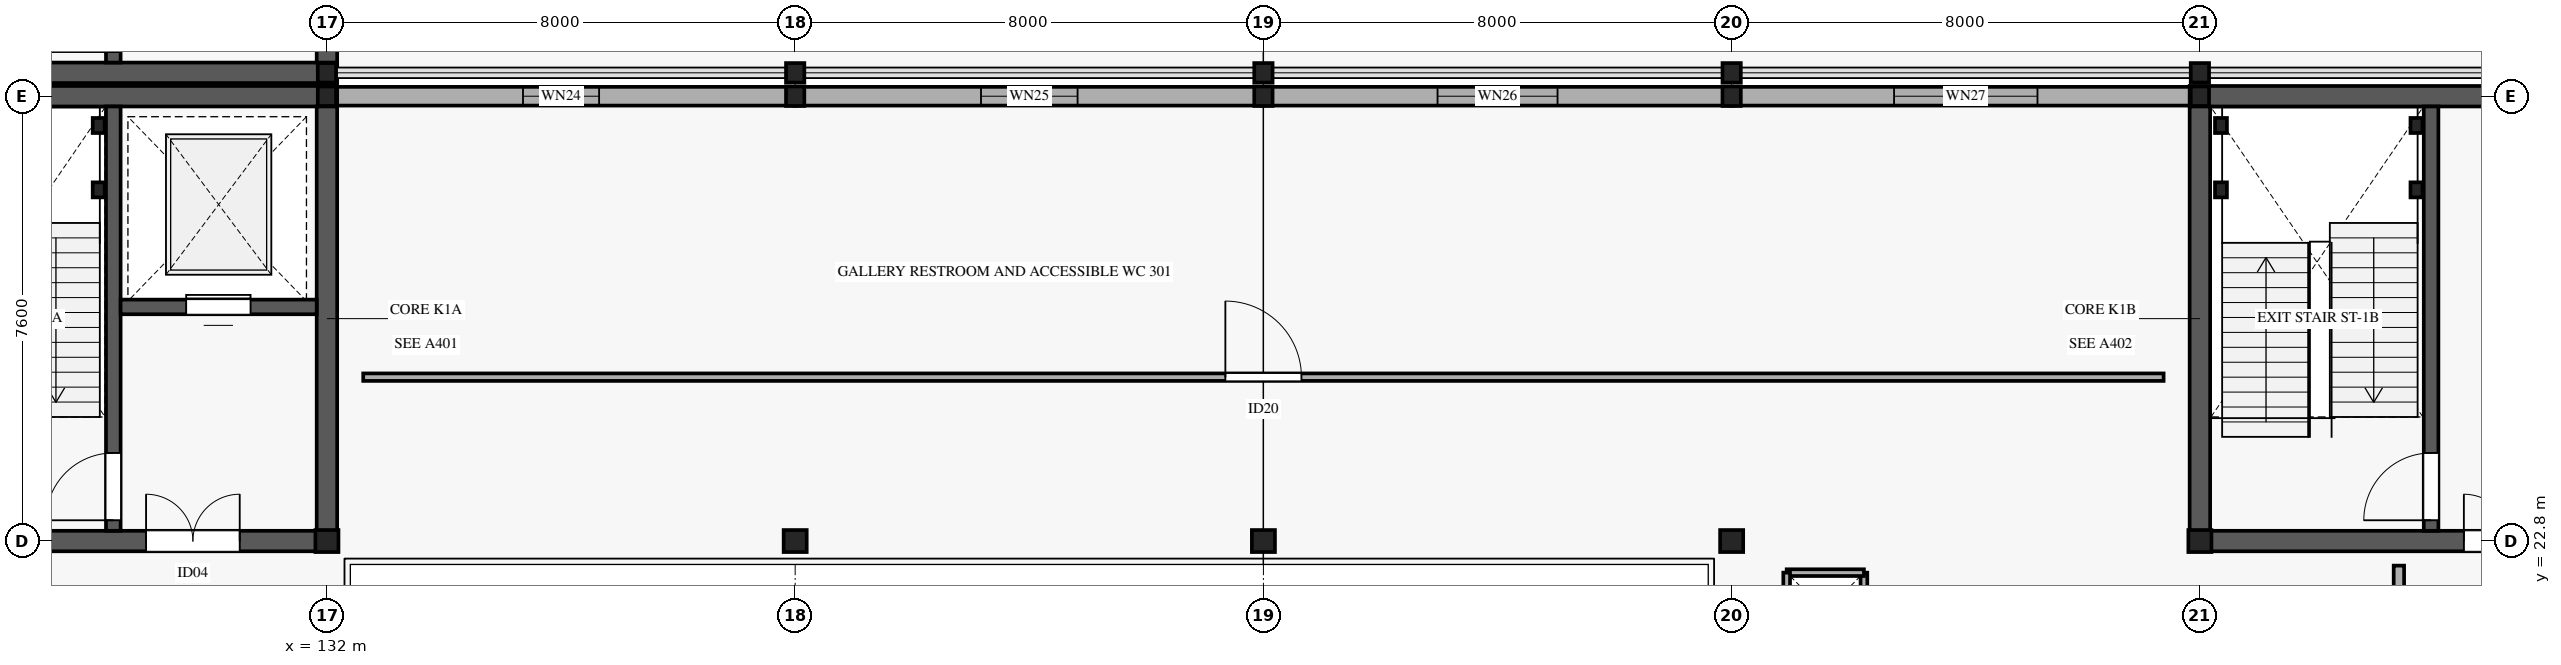
"""IFC4 building model, lengths in metres.
Left out: names, types, materials, properties, quantities, classifications, styles, units other than length and angle.
Written with IfcOpenShell. Run it as: python <this file> out.ifc"""

import sys

from ifc_helpers import new_model, si_unit, direction, frame, frame_2d, origin, origin_2d, place, context, subcontext, project, spatial, rectangle, i_section, extrude, element, fill, save


model = new_model("IFC4")
c1 = context("Model", 3, precision=1e-05, world=origin(), true_north=direction((0.0, 1.0)))
c2 = subcontext(c1, "Body", "Model", "MODEL_VIEW")
j1 = project(units=[si_unit("LENGTHUNIT", "METRE"), si_unit("PLANEANGLEUNIT", "RADIAN")], contexts=[c1])
p1 = place(None, origin())
s1 = spatial("IfcSite", under=j1, at=p1, CompositionType="ELEMENT")
p2 = place(p1, origin())
s2 = spatial("IfcBuilding", under=s1, at=p2, CompositionType="ELEMENT")
p3 = place(p2, frame((0.0, 0.0, 10.8)))
s3 = spatial("IfcBuildingStorey", under=s2, at=p3, CompositionType="ELEMENT", Elevation=10.8)
p4 = place(p3, frame((132.0, 22.8, 0.0), z_axis=(0.0, 0.0, 1.0), x_axis=(1.0, 0.0, 0.0)))
e1 = element("IfcColumn", 1, at=p4, inside=s3, PredefinedType="COLUMN", context=c2, shape_type="SweptSolid", body=[
    extrude(i_section(OverallWidth=0.394, OverallDepth=0.376, WebThickness=0.017, FlangeThickness=0.028, FilletRadius=0.015, at=origin_2d()), origin(), (0.0, 0.0, 1.0), 4.59),
])
p5 = place(p3, frame((132.0, 30.4, 0.0), z_axis=(0.0, 0.0, 1.0), x_axis=(1.0, 0.0, 0.0)))
e2 = element("IfcColumn", 2, at=p5, inside=s3, PredefinedType="COLUMN", context=c2, shape_type="SweptSolid", body=[
    extrude(i_section(OverallWidth=0.313, OverallDepth=0.333, WebThickness=0.018, FlangeThickness=0.028, FilletRadius=0.015, at=origin_2d()), origin(), (0.0, 0.0, 1.0), 4.59),
])
p6 = place(p3, frame((140.0, 22.8, 0.0), z_axis=(0.0, 0.0, 1.0), x_axis=(1.0, 0.0, 0.0)))
e3 = element("IfcColumn", 3, at=p6, inside=s3, PredefinedType="COLUMN", context=c2, shape_type="SweptSolid", body=[
    extrude(i_section(OverallWidth=0.394, OverallDepth=0.376, WebThickness=0.017, FlangeThickness=0.028, FilletRadius=0.015, at=origin_2d()), origin(), (0.0, 0.0, 1.0), 4.59),
])
p7 = place(p3, frame((140.0, 30.4, 0.0), z_axis=(0.0, 0.0, 1.0), x_axis=(1.0, 0.0, 0.0)))
e4 = element("IfcColumn", 4, at=p7, inside=s3, PredefinedType="COLUMN", context=c2, shape_type="SweptSolid", body=[
    extrude(i_section(OverallWidth=0.313, OverallDepth=0.333, WebThickness=0.018, FlangeThickness=0.028, FilletRadius=0.015, at=origin_2d()), origin(), (0.0, 0.0, 1.0), 4.59),
])
p8 = place(p3, frame((148.0, 22.8, 0.0), z_axis=(0.0, 0.0, 1.0), x_axis=(1.0, 0.0, 0.0)))
e5 = element("IfcColumn", 5, at=p8, inside=s3, PredefinedType="COLUMN", context=c2, shape_type="SweptSolid", body=[
    extrude(i_section(OverallWidth=0.394, OverallDepth=0.376, WebThickness=0.017, FlangeThickness=0.028, FilletRadius=0.015, at=origin_2d()), origin(), (0.0, 0.0, 1.0), 4.59),
])
p9 = place(p3, frame((148.0, 30.4, 0.0), z_axis=(0.0, 0.0, 1.0), x_axis=(1.0, 0.0, 0.0)))
e6 = element("IfcColumn", 6, at=p9, inside=s3, PredefinedType="COLUMN", context=c2, shape_type="SweptSolid", body=[
    extrude(i_section(OverallWidth=0.313, OverallDepth=0.333, WebThickness=0.018, FlangeThickness=0.028, FilletRadius=0.015, at=origin_2d()), origin(), (0.0, 0.0, 1.0), 4.59),
])
p10 = place(p3, frame((156.0, 22.8, 0.0), z_axis=(0.0, 0.0, 1.0), x_axis=(1.0, 0.0, 0.0)))
e7 = element("IfcColumn", 7, at=p10, inside=s3, PredefinedType="COLUMN", context=c2, shape_type="SweptSolid", body=[
    extrude(i_section(OverallWidth=0.394, OverallDepth=0.376, WebThickness=0.017, FlangeThickness=0.028, FilletRadius=0.015, at=origin_2d()), origin(), (0.0, 0.0, 1.0), 4.59),
])
p11 = place(p3, frame((156.0, 30.4, 0.0), z_axis=(0.0, 0.0, 1.0), x_axis=(1.0, 0.0, 0.0)))
e8 = element("IfcColumn", 8, at=p11, inside=s3, PredefinedType="COLUMN", context=c2, shape_type="SweptSolid", body=[
    extrude(i_section(OverallWidth=0.313, OverallDepth=0.333, WebThickness=0.018, FlangeThickness=0.028, FilletRadius=0.015, at=origin_2d()), origin(), (0.0, 0.0, 1.0), 4.59),
])
p12 = place(p3, frame((164.0, 22.8, 0.0), z_axis=(0.0, 0.0, 1.0), x_axis=(1.0, 0.0, 0.0)))
e9 = element("IfcColumn", 9, at=p12, inside=s3, PredefinedType="COLUMN", context=c2, shape_type="SweptSolid", body=[
    extrude(i_section(OverallWidth=0.394, OverallDepth=0.376, WebThickness=0.017, FlangeThickness=0.028, FilletRadius=0.015, at=origin_2d()), origin(), (0.0, 0.0, 1.0), 4.59),
])
for number, where, z_axis, x_axis in (
    (10, (164.0, 30.4, 0.0), (0.0, 0.0, 1.0), (1.0, 0.0, 0.0)),
    (11, (132.0, 30.8, 0.0), (0.0, 0.0, 1.0), (1.0, 0.0, 0.0)),
    (12, (140.0, 30.8, 0.0), (0.0, 0.0, 1.0), (1.0, 0.0, 0.0)),
    (13, (148.0, 30.8, 0.0), (0.0, 0.0, 1.0), (1.0, 0.0, 0.0)),
    (14, (156.0, 30.8, 0.0), (0.0, 0.0, 1.0), (1.0, 0.0, 0.0)),
    (15, (164.0, 30.8, 0.0), (0.0, 0.0, 1.0), (1.0, 0.0, 0.0)),
):
    element("IfcColumn", number, at=place(p3, frame(where, z_axis=z_axis, x_axis=x_axis)), inside=s3, PredefinedType="COLUMN", context=c2, shape_type="SweptSolid", body=[
        extrude(i_section(OverallWidth=0.313, OverallDepth=0.333, WebThickness=0.018, FlangeThickness=0.028, FilletRadius=0.015, at=origin_2d()), origin(), (0.0, 0.0, 1.0), 4.59),
    ])
p13 = place(p3, frame((131.98, 30.4, 0.0), z_axis=(0.0, 0.0, 1.0), x_axis=(1.0, 0.0, 0.0)))
e16 = element("IfcWall", 16, at=p13, inside=s3, PredefinedType="STANDARD", context=c2, shape_type="SweptSolid", body=[
    extrude(rectangle(XDim=8.04, YDim=0.32, at=frame_2d((4.02, 0.0))), origin(), (0.0, 0.0, 1.0), 3.66),
])
p14 = place(p13, frame((3.37, 0.0, 0.75)))
e17 = element("IfcOpeningElement", 17, at=p14, cuts=e16, PredefinedType="OPENING", context=c2, shape_type="SweptSolid", body=[
    extrude(rectangle(XDim=1.3, YDim=1.55, at=frame_2d((0.65, 0.775))), frame((0.0, 0.17, 0.0), z_axis=(0.0, -1.0, 0.0), x_axis=(1.0, 0.0, 0.0)), (0.0, 0.0, 1.0), 0.34),
])
p15 = place(p3, frame((139.98, 30.4, 0.0), z_axis=(0.0, 0.0, 1.0), x_axis=(1.0, 0.0, 0.0)))
e18 = element("IfcWall", 18, at=p15, inside=s3, PredefinedType="STANDARD", context=c2, shape_type="SweptSolid", body=[
    extrude(rectangle(XDim=8.04, YDim=0.32, at=frame_2d((4.02, 0.0))), origin(), (0.0, 0.0, 1.0), 3.66),
])
p16 = place(p15, frame((3.195, 0.0, 0.75)))
e19 = element("IfcOpeningElement", 19, at=p16, cuts=e18, PredefinedType="OPENING", context=c2, shape_type="SweptSolid", body=[
    extrude(rectangle(XDim=1.65, YDim=1.55, at=frame_2d((0.825, 0.775))), frame((0.0, 0.17, 0.0), z_axis=(0.0, -1.0, 0.0), x_axis=(1.0, 0.0, 0.0)), (0.0, 0.0, 1.0), 0.34),
])
p17 = place(p3, frame((147.98, 30.4, 0.0), z_axis=(0.0, 0.0, 1.0), x_axis=(1.0, 0.0, 0.0)))
e20 = element("IfcWall", 20, at=p17, inside=s3, PredefinedType="STANDARD", context=c2, shape_type="SweptSolid", body=[
    extrude(rectangle(XDim=8.04, YDim=0.32, at=frame_2d((4.02, 0.0))), origin(), (0.0, 0.0, 1.0), 3.66),
])
p18 = place(p17, frame((2.995, 0.0, 0.75)))
e21 = element("IfcOpeningElement", 21, at=p18, cuts=e20, PredefinedType="OPENING", context=c2, shape_type="SweptSolid", body=[
    extrude(rectangle(XDim=2.05, YDim=1.55, at=frame_2d((1.025, 0.775))), frame((0.0, 0.17, 0.0), z_axis=(0.0, -1.0, 0.0), x_axis=(1.0, 0.0, 0.0)), (0.0, 0.0, 1.0), 0.34),
])
p19 = place(p3, frame((155.98, 30.4, 0.0), z_axis=(0.0, 0.0, 1.0), x_axis=(1.0, 0.0, 0.0)))
e22 = element("IfcWall", 22, at=p19, inside=s3, PredefinedType="STANDARD", context=c2, shape_type="SweptSolid", body=[
    extrude(rectangle(XDim=8.04, YDim=0.32, at=frame_2d((4.02, 0.0))), origin(), (0.0, 0.0, 1.0), 3.66),
])
p20 = place(p19, frame((2.795, 0.0, 0.75)))
e23 = element("IfcOpeningElement", 23, at=p20, cuts=e22, PredefinedType="OPENING", context=c2, shape_type="SweptSolid", body=[
    extrude(rectangle(XDim=2.45, YDim=1.55, at=frame_2d((1.225, 0.775))), frame((0.0, 0.17, 0.0), z_axis=(0.0, -1.0, 0.0), x_axis=(1.0, 0.0, 0.0)), (0.0, 0.0, 1.0), 0.34),
])
for number, where, z_axis, x_axis in (
    (24, (158.26, 20.94, 0.0), (0.0, 0.0, 1.0), (0.0, 1.0, 0.0)),
    (25, (158.26, 22.26, 0.0), (0.0, 0.0, 1.0), (-1.0, 0.0, 0.0)),
    (26, (156.94, 22.26, 0.0), (0.0, 0.0, 1.0), (0.0, -1.0, 0.0)),
):
    element("IfcWall", number, at=place(p3, frame(where, z_axis=z_axis, x_axis=x_axis)), inside=s3, PredefinedType="PARTITIONING", context=c2, shape_type="SweptSolid", body=[
        extrude(rectangle(XDim=1.32, YDim=0.115, at=frame_2d((0.66, 0.0))), origin(), (0.0, 0.0, 1.0), 3.75),
    ])
p21 = place(p3, frame((124.225, 22.8, 0.0), z_axis=(0.0, 0.0, 1.0), x_axis=(1.0, 0.0, 0.0)))
e27 = element("IfcWall", 27, at=p21, inside=s3, PredefinedType="SHEAR", context=c2, shape_type="SweptSolid", body=[
    extrude(rectangle(XDim=7.95, YDim=0.35, at=frame_2d((3.975, 0.0))), origin(), (0.0, 0.0, 1.0), 4.59),
])
p22 = place(p21, frame((4.685, 0.0, 0.0)))
e28 = element("IfcOpeningElement", 28, at=p22, cuts=e27, PredefinedType="OPENING", context=c2, shape_type="SweptSolid", body=[
    extrude(rectangle(XDim=1.6, YDim=2.35, at=frame_2d((0.8, 1.175))), frame((0.0, 0.185, 0.0), z_axis=(0.0, -1.0, 0.0), x_axis=(1.0, 0.0, 0.0)), (0.0, 0.0, 1.0), 0.37),
])
p23 = place(p3, frame((124.225, 30.4, 0.0), z_axis=(0.0, 0.0, 1.0), x_axis=(1.0, 0.0, 0.0)))
e29 = element("IfcWall", 29, at=p23, inside=s3, PredefinedType="SHEAR", context=c2, shape_type="SweptSolid", body=[
    extrude(rectangle(XDim=7.95, YDim=0.35, at=frame_2d((3.975, 0.0))), origin(), (0.0, 0.0, 1.0), 4.59),
])
p24 = place(p3, frame((132.0, 22.975, 0.0), z_axis=(0.0, 0.0, 1.0), x_axis=(0.0, 1.0, 0.0)))
e30 = element("IfcWall", 30, at=p24, inside=s3, PredefinedType="SHEAR", context=c2, shape_type="SweptSolid", body=[
    extrude(rectangle(XDim=7.25, YDim=0.35, at=frame_2d((3.625, 0.0))), origin(), (0.0, 0.0, 1.0), 4.59),
])
p25 = place(p3, frame((128.35, 22.975, 0.0), z_axis=(0.0, 0.0, 1.0), x_axis=(0.0, 1.0, 0.0)))
e31 = element("IfcWall", 31, at=p25, inside=s3, PredefinedType="SHEAR", context=c2, shape_type="SweptSolid", body=[
    extrude(rectangle(XDim=7.25, YDim=0.25, at=frame_2d((3.625, 0.0))), origin(), (0.0, 0.0, 1.0), 4.59),
])
p26 = place(p25, frame((0.18, 0.0, 0.0)))
e32 = element("IfcOpeningElement", 32, at=p26, cuts=e31, PredefinedType="OPENING", context=c2, shape_type="SweptSolid", body=[
    extrude(rectangle(XDim=1.15, YDim=2.2, at=frame_2d((0.575, 1.1))), frame((0.0, 0.135, 0.0), z_axis=(0.0, -1.0, 0.0), x_axis=(1.0, 0.0, 0.0)), (0.0, 0.0, 1.0), 0.27),
])
p27 = place(p3, frame((128.475, 26.8, 0.0), z_axis=(0.0, 0.0, 1.0), x_axis=(1.0, 0.0, 0.0)))
e33 = element("IfcWall", 33, at=p27, inside=s3, PredefinedType="SHEAR", context=c2, shape_type="SweptSolid", body=[
    extrude(rectangle(XDim=3.35, YDim=0.25, at=frame_2d((1.675, 0.0))), origin(), (0.0, 0.0, 1.0), 4.59),
])
p28 = place(p27, frame((1.12, 0.0, 0.0)))
e34 = element("IfcOpeningElement", 34, at=p28, cuts=e33, PredefinedType="OPENING", context=c2, shape_type="SweptSolid", body=[
    extrude(rectangle(XDim=1.1, YDim=2.2, at=frame_2d((0.55, 1.1))), frame((0.0, 0.135, 0.0), z_axis=(0.0, -1.0, 0.0), x_axis=(1.0, 0.0, 0.0)), (0.0, 0.0, 1.0), 0.27),
])
for number, where, z_axis, x_axis in (
    (35, (128.1, 28.8, 0.0), (0.0, 0.0, 1.0), (1.0, 0.0, 0.0)),
    (36, (128.1, 29.9, 0.0), (0.0, 0.0, 1.0), (1.0, 0.0, 0.0)),
):
    element("IfcColumn", number, at=place(p3, frame(where, z_axis=z_axis, x_axis=x_axis)), inside=s3, PredefinedType="COLUMN", context=c2, shape_type="SweptSolid", body=[
        extrude(i_section(OverallWidth=0.204, OverallDepth=0.257, WebThickness=0.009, FlangeThickness=0.016, FilletRadius=0.013, at=origin_2d()), origin(), (0.0, 0.0, 1.0), 4.795),
    ])
p29 = place(p3, frame((163.825, 22.8, 0.0), z_axis=(0.0, 0.0, 1.0), x_axis=(1.0, 0.0, 0.0)))
e37 = element("IfcWall", 37, at=p29, inside=s3, PredefinedType="SHEAR", context=c2, shape_type="SweptSolid", body=[
    extrude(rectangle(XDim=8.35, YDim=0.35, at=frame_2d((4.175, 0.0))), origin(), (0.0, 0.0, 1.0), 4.59),
])
p30 = place(p29, frame((4.685, 0.0, 0.0)))
e38 = element("IfcOpeningElement", 38, at=p30, cuts=e37, PredefinedType="OPENING", context=c2, shape_type="SweptSolid", body=[
    extrude(rectangle(XDim=1.6, YDim=2.35, at=frame_2d((0.8, 1.175))), frame((0.0, 0.185, 0.0), z_axis=(0.0, -1.0, 0.0), x_axis=(1.0, 0.0, 0.0)), (0.0, 0.0, 1.0), 0.37),
])
p31 = place(p3, frame((163.825, 30.4, 0.0), z_axis=(0.0, 0.0, 1.0), x_axis=(1.0, 0.0, 0.0)))
e39 = element("IfcWall", 39, at=p31, inside=s3, PredefinedType="SHEAR", context=c2, shape_type="SweptSolid", body=[
    extrude(rectangle(XDim=8.35, YDim=0.35, at=frame_2d((4.175, 0.0))), origin(), (0.0, 0.0, 1.0), 4.59),
])
p32 = place(p3, frame((164.0, 22.975, 0.0), z_axis=(0.0, 0.0, 1.0), x_axis=(0.0, 1.0, 0.0)))
e40 = element("IfcWall", 40, at=p32, inside=s3, PredefinedType="SHEAR", context=c2, shape_type="SweptSolid", body=[
    extrude(rectangle(XDim=7.25, YDim=0.35, at=frame_2d((3.625, 0.0))), origin(), (0.0, 0.0, 1.0), 4.59),
])
p33 = place(p3, frame((167.95, 22.975, 0.0), z_axis=(0.0, 0.0, 1.0), x_axis=(0.0, 1.0, 0.0)))
e41 = element("IfcWall", 41, at=p33, inside=s3, PredefinedType="SHEAR", context=c2, shape_type="SweptSolid", body=[
    extrude(rectangle(XDim=7.25, YDim=0.25, at=frame_2d((3.625, 0.0))), origin(), (0.0, 0.0, 1.0), 4.59),
])
p34 = place(p33, frame((0.18, 0.0, 0.0)))
e42 = element("IfcOpeningElement", 42, at=p34, cuts=e41, PredefinedType="OPENING", context=c2, shape_type="SweptSolid", body=[
    extrude(rectangle(XDim=1.15, YDim=2.2, at=frame_2d((0.575, 1.1))), frame((0.0, 0.135, 0.0), z_axis=(0.0, -1.0, 0.0), x_axis=(1.0, 0.0, 0.0)), (0.0, 0.0, 1.0), 0.27),
])
for number, where, z_axis, x_axis in (
    (43, (164.36, 28.8, 0.0), (0.0, 0.0, 1.0), (1.0, 0.0, 0.0)),
    (44, (167.7, 28.8, 0.0), (0.0, 0.0, 1.0), (1.0, 0.0, 0.0)),
    (45, (164.36, 29.9, 0.0), (0.0, 0.0, 1.0), (1.0, 0.0, 0.0)),
    (46, (167.7, 29.9, 0.0), (0.0, 0.0, 1.0), (1.0, 0.0, 0.0)),
):
    element("IfcColumn", number, at=place(p3, frame(where, z_axis=z_axis, x_axis=x_axis)), inside=s3, PredefinedType="COLUMN", context=c2, shape_type="SweptSolid", body=[
        extrude(i_section(OverallWidth=0.204, OverallDepth=0.257, WebThickness=0.009, FlangeThickness=0.016, FilletRadius=0.013, at=origin_2d()), origin(), (0.0, 0.0, 1.0), 4.795),
    ])
p35 = place(p3, frame((124.225, 30.8, 0.0), z_axis=(0.0, 0.0, 1.0), x_axis=(1.0, 0.0, 0.0)))
e47 = element("IfcWall", 47, at=p35, inside=s3, PredefinedType="SHEAR", context=c2, shape_type="SweptSolid", body=[
    extrude(rectangle(XDim=7.95, YDim=0.35, at=frame_2d((3.975, 0.0))), origin(), (0.0, 0.0, 1.0), 4.59),
])
p36 = place(p3, frame((132.0, 30.975, 0.0), z_axis=(0.0, 0.0, 1.0), x_axis=(0.0, 1.0, 0.0)))
e48 = element("IfcWall", 48, at=p36, inside=s3, PredefinedType="SHEAR", context=c2, shape_type="SweptSolid", body=[
    extrude(rectangle(XDim=6.85, YDim=0.35, at=frame_2d((3.425, 0.0))), origin(), (0.0, 0.0, 1.0), 4.59),
])
p37 = place(p36, frame((1.15, 0.0, 0.0)))
e49 = element("IfcOpeningElement", 49, at=p37, cuts=e48, PredefinedType="OPENING", context=c2, shape_type="SweptSolid", body=[
    extrude(rectangle(XDim=1.6, YDim=2.35, at=frame_2d((0.8, 1.175))), frame((0.0, 0.185, 0.0), z_axis=(0.0, -1.0, 0.0), x_axis=(1.0, 0.0, 0.0)), (0.0, 0.0, 1.0), 0.37),
])
p38 = place(p3, frame((128.35, 30.975, 0.0), z_axis=(0.0, 0.0, 1.0), x_axis=(0.0, 1.0, 0.0)))
e50 = element("IfcWall", 50, at=p38, inside=s3, PredefinedType="SHEAR", context=c2, shape_type="SweptSolid", body=[
    extrude(rectangle(XDim=6.85, YDim=0.25, at=frame_2d((3.425, 0.0))), origin(), (0.0, 0.0, 1.0), 4.59),
])
p39 = place(p38, frame((0.18, 0.0, 0.0)))
e51 = element("IfcOpeningElement", 51, at=p39, cuts=e50, PredefinedType="OPENING", context=c2, shape_type="SweptSolid", body=[
    extrude(rectangle(XDim=1.15, YDim=2.2, at=frame_2d((0.575, 1.1))), frame((0.0, 0.135, 0.0), z_axis=(0.0, -1.0, 0.0), x_axis=(1.0, 0.0, 0.0)), (0.0, 0.0, 1.0), 0.27),
])
p40 = place(p3, frame((167.4, 4.22, 0.0), z_axis=(0.0, 0.0, 1.0), x_axis=(0.0, 1.0, 0.0)))
e52 = element("IfcWall", 52, at=p40, inside=s3, PredefinedType="PARTITIONING", context=c2, shape_type="SweptSolid", body=[
    extrude(rectangle(XDim=18.16, YDim=0.178, at=frame_2d((9.08, 0.0))), origin(), (0.0, 0.0, 1.0), 3.45),
])
p41 = place(p3, frame((132.62, 25.6, 0.0), z_axis=(0.0, 0.0, 1.0), x_axis=(1.0, 0.0, 0.0)))
e53 = element("IfcWall", 53, at=p41, inside=s3, PredefinedType="PARTITIONING", context=c2, shape_type="SweptSolid", body=[
    extrude(rectangle(XDim=30.76, YDim=0.128, at=frame_2d((15.38, 0.0))), origin(), (0.0, 0.0, 1.0), 3.45),
])
p42 = place(p41, frame((14.73, 0.0, 0.0)))
e54 = element("IfcOpeningElement", 54, at=p42, cuts=e53, PredefinedType="OPENING", context=c2, shape_type="SweptSolid", body=[
    extrude(rectangle(XDim=1.3, YDim=2.2, at=frame_2d((0.65, 1.1))), frame((0.0, 0.074, 0.0), z_axis=(0.0, -1.0, 0.0), x_axis=(1.0, 0.0, 0.0)), (0.0, 0.0, 1.0), 0.148),
])
p43 = place(p14, origin())
e55 = element("IfcWindow", 55, at=p43, inside=s3, PartitioningType="SINGLE_PANEL", PredefinedType="WINDOW", context=c2, shape_type="SweptSolid", body=[
    extrude(rectangle(XDim=1.3, YDim=1.55, at=frame_2d((0.65, 0.775))), frame((0.0, 0.03, 0.0), z_axis=(0.0, -1.0, 0.0), x_axis=(1.0, 0.0, 0.0)), (0.0, 0.0, 1.0), 0.06),
])
fill(e17, e55)
p44 = place(p16, origin())
e56 = element("IfcWindow", 56, at=p44, inside=s3, PartitioningType="SINGLE_PANEL", PredefinedType="WINDOW", context=c2, shape_type="SweptSolid", body=[
    extrude(rectangle(XDim=1.65, YDim=1.55, at=frame_2d((0.825, 0.775))), frame((0.0, 0.03, 0.0), z_axis=(0.0, -1.0, 0.0), x_axis=(1.0, 0.0, 0.0)), (0.0, 0.0, 1.0), 0.06),
])
fill(e19, e56)
p45 = place(p18, origin())
e57 = element("IfcWindow", 57, at=p45, inside=s3, PartitioningType="SINGLE_PANEL", PredefinedType="WINDOW", context=c2, shape_type="SweptSolid", body=[
    extrude(rectangle(XDim=2.05, YDim=1.55, at=frame_2d((1.025, 0.775))), frame((0.0, 0.03, 0.0), z_axis=(0.0, -1.0, 0.0), x_axis=(1.0, 0.0, 0.0)), (0.0, 0.0, 1.0), 0.06),
])
fill(e21, e57)
p46 = place(p20, origin())
e58 = element("IfcWindow", 58, at=p46, inside=s3, PartitioningType="SINGLE_PANEL", PredefinedType="WINDOW", context=c2, shape_type="SweptSolid", body=[
    extrude(rectangle(XDim=2.45, YDim=1.55, at=frame_2d((1.225, 0.775))), frame((0.0, 0.03, 0.0), z_axis=(0.0, -1.0, 0.0), x_axis=(1.0, 0.0, 0.0)), (0.0, 0.0, 1.0), 0.06),
])
fill(e23, e58)
p47 = place(p26, origin())
e59 = element("IfcDoor", 59, at=p47, inside=s3, OperationType="SINGLE_SWING_LEFT", PredefinedType="DOOR", context=c2, shape_type="SweptSolid", body=[
    extrude(rectangle(XDim=1.15, YDim=2.2, at=frame_2d((0.575, 1.1))), frame((0.0, 0.025, 0.0), z_axis=(0.0, -1.0, 0.0), x_axis=(1.0, 0.0, 0.0)), (0.0, 0.0, 1.0), 0.05),
])
fill(e32, e59)
p48 = place(p22, origin())
e60 = element("IfcDoor", 60, at=p48, inside=s3, OperationType="DOUBLE_DOOR_SINGLE_SWING", PredefinedType="DOOR", context=c2, shape_type="SweptSolid", body=[
    extrude(rectangle(XDim=1.6, YDim=2.35, at=frame_2d((0.8, 1.175))), frame((0.0, 0.025, 0.0), z_axis=(0.0, -1.0, 0.0), x_axis=(1.0, 0.0, 0.0)), (0.0, 0.0, 1.0), 0.05),
])
fill(e28, e60)
p49 = place(p28, origin())
e61 = element("IfcDoor", 61, at=p49, inside=s3, OperationType="SLIDING_TO_LEFT", PredefinedType="DOOR", context=c2, shape_type="SweptSolid", body=[
    extrude(rectangle(XDim=1.1, YDim=2.2, at=frame_2d((0.55, 1.1))), frame((0.0, 0.025, 0.0), z_axis=(0.0, -1.0, 0.0), x_axis=(1.0, 0.0, 0.0)), (0.0, 0.0, 1.0), 0.05),
])
fill(e34, e61)
p50 = place(p34, origin())
e62 = element("IfcDoor", 62, at=p50, inside=s3, OperationType="SINGLE_SWING_LEFT", PredefinedType="DOOR", context=c2, shape_type="SweptSolid", body=[
    extrude(rectangle(XDim=1.15, YDim=2.2, at=frame_2d((0.575, 1.1))), frame((0.0, 0.025, 0.0), z_axis=(0.0, -1.0, 0.0), x_axis=(1.0, 0.0, 0.0)), (0.0, 0.0, 1.0), 0.05),
])
fill(e42, e62)
p51 = place(p30, origin())
e63 = element("IfcDoor", 63, at=p51, inside=s3, OperationType="DOUBLE_DOOR_SINGLE_SWING", PredefinedType="DOOR", context=c2, shape_type="SweptSolid", body=[
    extrude(rectangle(XDim=1.6, YDim=2.35, at=frame_2d((0.8, 1.175))), frame((0.0, 0.025, 0.0), z_axis=(0.0, -1.0, 0.0), x_axis=(1.0, 0.0, 0.0)), (0.0, 0.0, 1.0), 0.05),
])
fill(e38, e63)
p52 = place(p42, origin())
e64 = element("IfcDoor", 64, at=p52, inside=s3, OperationType="SINGLE_SWING_LEFT", PredefinedType="DOOR", context=c2, shape_type="SweptSolid", body=[
    extrude(rectangle(XDim=1.3, YDim=2.2, at=frame_2d((0.65, 1.1))), frame((0.0, 0.025, 0.0), z_axis=(0.0, -1.0, 0.0), x_axis=(1.0, 0.0, 0.0)), (0.0, 0.0, 1.0), 0.05),
])
fill(e54, e64)
save(model, sys.argv[1])
